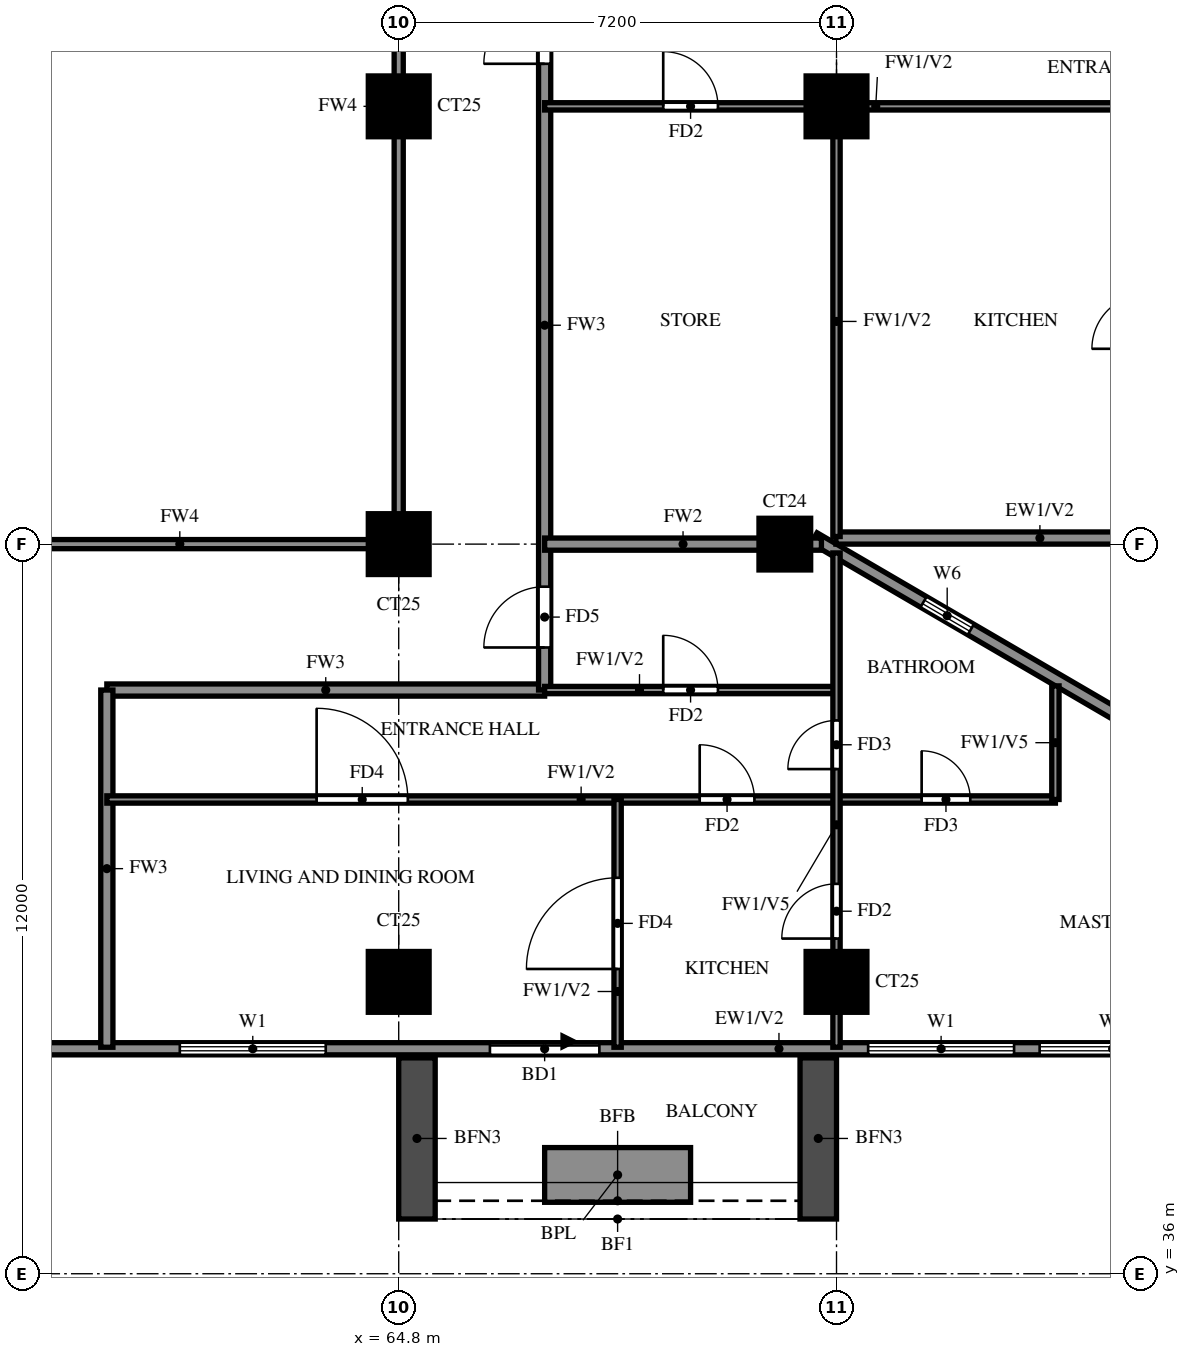
"""IFC4 building model, lengths in metres.
Left out: names, types, materials, properties, quantities, classifications, styles, units other than length and angle.
Written with IfcOpenShell. Run it as: python <this file> out.ifc"""

import sys

from ifc_helpers import new_model, si_unit, direction, frame, frame_2d, origin, origin_2d, place, context, subcontext, project, spatial, rectangle, extrude, source, transform, mapped, element, fill, save


model = new_model("IFC4")
c1 = context("Model", 3, precision=1e-05, world=origin(), true_north=direction((0.0, 1.0)))
c2 = subcontext(c1, "Body", "Model", "MODEL_VIEW")
j1 = project(units=[si_unit("LENGTHUNIT", "METRE"), si_unit("PLANEANGLEUNIT", "RADIAN")], contexts=[c1])
p1 = place(None, origin())
s1 = spatial("IfcSite", under=j1, at=p1, CompositionType="ELEMENT")
p2 = place(p1, origin())
s2 = spatial("IfcBuilding", under=s1, at=p2, CompositionType="ELEMENT")
p3 = place(p2, frame((0.0, 0.0, 160.5)))
s3 = spatial("IfcBuildingStorey", under=s2, at=p3, CompositionType="ELEMENT", Elevation=160.5)
m1 = source(origin(), c2, "Body", "SweptSolid", [
    extrude(rectangle(XDim=1.0, YDim=1.0, at=origin_2d()), origin(), (0.0, 0.0, 1.0), 3.2),
])
for number, where, z_axis, x_axis in (
    (1, (64.8, 40.8, 0.0), (0.0, 0.0, 1.0), (1.0, 0.0, 0.0)),
    (2, (72.0, 40.8, 0.0), (0.0, 0.0, 1.0), (1.0, 0.0, 0.0)),
    (3, (64.8, 48.0, 0.0), (0.0, 0.0, 1.0), (1.0, 0.0, 0.0)),
):
    element("IfcColumn", number, at=place(p3, frame(where, z_axis=z_axis, x_axis=x_axis)), inside=s3, PredefinedType="COLUMN", context=c2, shape_type="MappedRepresentation", body=[
        mapped(m1, transform((0.0, 0.0, 0.0))),
    ])
m2 = source(origin(), c2, "Body", "SweptSolid", [
    extrude(rectangle(XDim=0.85, YDim=0.85, at=origin_2d()), origin(), (0.0, 0.0, 1.0), 3.2),
])
p4 = place(p3, frame((71.15, 48.0, 0.0), z_axis=(0.0, 0.0, 1.0), x_axis=(1.0, 0.0, 0.0)))
e4 = element("IfcColumn", 4, at=p4, inside=s3, PredefinedType="COLUMN", context=c2, shape_type="MappedRepresentation", body=[
    mapped(m2, transform((0.0, 0.0, 0.0))),
])
for number, where, z_axis, x_axis in (
    (5, (64.8, 55.2, 0.0), (0.0, 0.0, 1.0), (1.0, 0.0, 0.0)),
    (6, (72.0, 55.2, 0.0), (0.0, 0.0, 1.0), (1.0, 0.0, 0.0)),
):
    element("IfcColumn", number, at=place(p3, frame(where, z_axis=z_axis, x_axis=x_axis)), inside=s3, PredefinedType="COLUMN", context=c2, shape_type="MappedRepresentation", body=[
        mapped(m1, transform((0.0, 0.0, 0.0))),
    ])
p5 = place(p3, frame((85.719, 39.881, 0.0), z_axis=(0.0, 0.0, 1.0), x_axis=(-0.86377618652, 0.503875678716, 0.0)))
e7 = element("IfcWall", 7, at=p5, inside=s3, PredefinedType="SOLIDWALL", context=c2, shape_type="SweptSolid", body=[
    extrude(rectangle(XDim=16.311, YDim=0.2, at=frame_2d((8.156, 0.0))), origin(), (0.0, 0.0, 1.0), 3.2),
])
p6 = place(p5, frame((13.326, 0.0, 1.5)))
e8 = element("IfcOpeningElement", 8, at=p6, cuts=e7, PredefinedType="OPENING", context=c2, shape_type="SweptSolid", body=[
    extrude(rectangle(XDim=0.9, YDim=0.9, at=frame_2d((0.45, 0.45))), frame((0.0, 0.11, 0.0), z_axis=(0.0, -1.0, 0.0), x_axis=(1.0, 0.0, 0.0)), (0.0, 0.0, 1.0), 0.22),
])
p7 = place(p3, frame((71.99, 48.1, 0.0), z_axis=(0.0, 0.0, 1.0), x_axis=(1.0, 0.0, 0.0)))
e9 = element("IfcWall", 9, at=p7, inside=s3, PredefinedType="SOLIDWALL", context=c2, shape_type="SweptSolid", body=[
    extrude(rectangle(XDim=6.71, YDim=0.2, at=frame_2d((3.355, 0.0))), origin(), (0.0, 0.0, 1.0), 3.2),
])
p8 = place(p3, frame((58.8, 39.7, 0.0), z_axis=(0.0, 0.0, 1.0), x_axis=(1.0, 0.0, 0.0)))
e10 = element("IfcWall", 10, at=p8, inside=s3, PredefinedType="SOLIDWALL", context=c2, shape_type="SweptSolid", body=[
    extrude(rectangle(XDim=27.23, YDim=0.2, at=frame_2d((13.615, 0.0))), origin(), (0.0, 0.0, 1.0), 3.2),
])
p9 = place(p8, frame((7.5, 0.0, 0.0)))
e11 = element("IfcOpeningElement", 11, at=p9, cuts=e10, PredefinedType="OPENING", context=c2, shape_type="SweptSolid", body=[
    extrude(rectangle(XDim=1.8, YDim=2.4, at=frame_2d((0.9, 1.2))), frame((0.0, 0.11, 0.0), z_axis=(0.0, -1.0, 0.0), x_axis=(1.0, 0.0, 0.0)), (0.0, 0.0, 1.0), 0.22),
])
p10 = place(p8, frame((2.4, 0.0, 0.6)))
e12 = element("IfcOpeningElement", 12, at=p10, cuts=e10, PredefinedType="OPENING", context=c2, shape_type="SweptSolid", body=[
    extrude(rectangle(XDim=2.4, YDim=2.4, at=frame_2d((1.2, 1.2))), frame((0.0, 0.11, 0.0), z_axis=(0.0, -1.0, 0.0), x_axis=(1.0, 0.0, 0.0)), (0.0, 0.0, 1.0), 0.22),
])
p11 = place(p8, frame((13.72, 0.0, 0.6)))
e13 = element("IfcOpeningElement", 13, at=p11, cuts=e10, PredefinedType="OPENING", context=c2, shape_type="SweptSolid", body=[
    extrude(rectangle(XDim=2.4, YDim=2.4, at=frame_2d((1.2, 1.2))), frame((0.0, 0.11, 0.0), z_axis=(0.0, -1.0, 0.0), x_axis=(1.0, 0.0, 0.0)), (0.0, 0.0, 1.0), 0.22),
])
p12 = place(p8, frame((16.541, 0.0, 0.6)))
e14 = element("IfcOpeningElement", 14, at=p12, cuts=e10, PredefinedType="OPENING", context=c2, shape_type="SweptSolid", body=[
    extrude(rectangle(XDim=2.4, YDim=2.4, at=frame_2d((1.2, 1.2))), frame((0.0, 0.11, 0.0), z_axis=(0.0, -1.0, 0.0), x_axis=(1.0, 0.0, 0.0)), (0.0, 0.0, 1.0), 0.22),
])
p13 = place(p8, frame((19.361, 0.0, 0.6)))
e15 = element("IfcOpeningElement", 15, at=p13, cuts=e10, PredefinedType="OPENING", context=c2, shape_type="SweptSolid", body=[
    extrude(rectangle(XDim=2.4, YDim=2.4, at=frame_2d((1.2, 1.2))), frame((0.0, 0.11, 0.0), z_axis=(0.0, -1.0, 0.0), x_axis=(1.0, 0.0, 0.0)), (0.0, 0.0, 1.0), 0.22),
])
p14 = place(p8, frame((22.181, 0.0, 0.6)))
e16 = element("IfcOpeningElement", 16, at=p14, cuts=e10, PredefinedType="OPENING", context=c2, shape_type="SweptSolid", body=[
    extrude(rectangle(XDim=2.4, YDim=2.4, at=frame_2d((1.2, 1.2))), frame((0.0, 0.11, 0.0), z_axis=(0.0, -1.0, 0.0), x_axis=(1.0, 0.0, 0.0)), (0.0, 0.0, 1.0), 0.22),
])
p15 = place(p8, frame((25.99, 0.0, 0.6)))
e17 = element("IfcOpeningElement", 17, at=p15, cuts=e10, PredefinedType="OPENING", context=c2, shape_type="SweptSolid", body=[
    extrude(rectangle(XDim=0.9, YDim=2.4, at=frame_2d((0.45, 1.2))), frame((0.0, 0.11, 0.0), z_axis=(0.0, -1.0, 0.0), x_axis=(1.0, 0.0, 0.0)), (0.0, 0.0, 1.0), 0.22),
])
for number, where, z_axis, x_axis in (
    (18, (65.1, 39.55, 0.0), (0.0, 0.0, 1.0), (0.0, -1.0, 0.0)),
    (19, (71.7, 39.55, 0.0), (0.0, 0.0, 1.0), (0.0, -1.0, 0.0)),
):
    element("IfcWall", number, at=place(p3, frame(where, z_axis=z_axis, x_axis=x_axis)), inside=s3, PredefinedType="SOLIDWALL", context=c2, shape_type="SweptSolid", body=[
        extrude(rectangle(XDim=2.65, YDim=0.6, at=frame_2d((1.325, 0.0))), origin(), (0.0, 0.0, 1.0), 2.85),
    ])
p16 = place(p3, frame((67.2, 37.625, 0.0), z_axis=(0.0, 0.0, 1.0), x_axis=(1.0, 0.0, 0.0)))
e20 = element("IfcWall", 20, at=p16, inside=s3, PredefinedType="SOLIDWALL", context=c2, shape_type="SweptSolid", body=[
    extrude(rectangle(XDim=2.4, YDim=0.9, at=frame_2d((1.2, 0.0))), origin(), (0.0, 0.0, 1.0), 0.9),
])
p17 = place(p3, frame((60.0, 45.6, 0.0), z_axis=(0.0, 0.0, 1.0), x_axis=(1.0, 0.0, 0.0)))
e21 = element("IfcWall", 21, at=p17, inside=s3, PredefinedType="SOLIDWALL", context=c2, shape_type="SweptSolid", body=[
    extrude(rectangle(XDim=7.2, YDim=0.2, at=frame_2d((3.6, 0.0))), origin(), (0.0, 0.0, 1.0), 3.2),
])
p18 = place(p3, frame((60.0, 39.725, 0.0), z_axis=(0.0, 0.0, 1.0), x_axis=(0.0, 1.0, 0.0)))
e22 = element("IfcWall", 22, at=p18, inside=s3, PredefinedType="SOLIDWALL", context=c2, shape_type="SweptSolid", body=[
    extrude(rectangle(XDim=5.875, YDim=0.2, at=frame_2d((2.938, 0.0))), origin(), (0.0, 0.0, 1.0), 3.2),
])
p19 = place(p3, frame((67.2, 45.6, 0.0), z_axis=(0.0, 0.0, 1.0), x_axis=(0.0, 1.0, 0.0)))
e23 = element("IfcWall", 23, at=p19, inside=s3, PredefinedType="SOLIDWALL", context=c2, shape_type="SweptSolid", body=[
    extrude(rectangle(XDim=12.0, YDim=0.2, at=frame_2d((6.0, 0.0))), origin(), (0.0, 0.0, 1.0), 3.2),
])
p20 = place(p19, frame((10.3, 0.0, 0.0)))
e24 = element("IfcOpeningElement", 24, at=p20, cuts=e23, PredefinedType="OPENING", context=c2, shape_type="SweptSolid", body=[
    extrude(rectangle(XDim=1.0, YDim=2.1, at=frame_2d((0.5, 1.05))), frame((0.0, 0.11, 0.0), z_axis=(0.0, -1.0, 0.0), x_axis=(1.0, 0.0, 0.0)), (0.0, 0.0, 1.0), 0.22),
])
p21 = place(p19, frame((0.7, 0.0, 0.0)))
e25 = element("IfcOpeningElement", 25, at=p21, cuts=e23, PredefinedType="OPENING", context=c2, shape_type="SweptSolid", body=[
    extrude(rectangle(XDim=1.0, YDim=2.1, at=frame_2d((0.5, 1.05))), frame((0.0, 0.11, 0.0), z_axis=(0.0, -1.0, 0.0), x_axis=(1.0, 0.0, 0.0)), (0.0, 0.0, 1.0), 0.22),
])
p22 = place(p3, frame((67.2, 48.0, 0.0), z_axis=(0.0, 0.0, 1.0), x_axis=(1.0, 0.0, 0.0)))
e26 = element("IfcWall", 26, at=p22, inside=s3, PredefinedType="SOLIDWALL", context=c2, shape_type="SweptSolid", body=[
    extrude(rectangle(XDim=4.552, YDim=0.2, at=frame_2d((2.276, 0.0))), origin(), (0.0, 0.0, 1.0), 3.2),
])
p23 = place(p3, frame((60.0, 43.8, 0.0), z_axis=(0.0, 0.0, 1.0), x_axis=(1.0, 0.0, 0.0)))
e27 = element("IfcWall", 27, at=p23, inside=s3, PredefinedType="PARTITIONING", context=c2, shape_type="SweptSolid", body=[
    extrude(rectangle(XDim=15.6, YDim=0.12, at=frame_2d((7.8, 0.0))), origin(), (0.0, 0.0, 1.0), 3.2),
])
p24 = place(p23, frame((9.75, 0.0, 0.0)))
e28 = element("IfcOpeningElement", 28, at=p24, cuts=e27, PredefinedType="OPENING", context=c2, shape_type="SweptSolid", body=[
    extrude(rectangle(XDim=0.9, YDim=2.1, at=frame_2d((0.45, 1.05))), frame((0.0, 0.07, 0.0), z_axis=(0.0, -1.0, 0.0), x_axis=(1.0, 0.0, 0.0)), (0.0, 0.0, 1.0), 0.14),
])
p25 = place(p23, frame((3.45, 0.0, 0.0)))
e29 = element("IfcOpeningElement", 29, at=p25, cuts=e27, PredefinedType="OPENING", context=c2, shape_type="SweptSolid", body=[
    extrude(rectangle(XDim=1.5, YDim=2.1, at=frame_2d((0.75, 1.05))), frame((0.0, 0.07, 0.0), z_axis=(0.0, -1.0, 0.0), x_axis=(1.0, 0.0, 0.0)), (0.0, 0.0, 1.0), 0.14),
])
p26 = place(p23, frame((13.4, 0.0, 0.0)))
e30 = element("IfcOpeningElement", 30, at=p26, cuts=e27, PredefinedType="OPENING", context=c2, shape_type="SweptSolid", body=[
    extrude(rectangle(XDim=0.8, YDim=2.1, at=frame_2d((0.4, 1.05))), frame((0.0, 0.07, 0.0), z_axis=(0.0, -1.0, 0.0), x_axis=(1.0, 0.0, 0.0)), (0.0, 0.0, 1.0), 0.14),
])
p27 = place(p3, frame((67.2, 45.6, 0.0), z_axis=(0.0, 0.0, 1.0), x_axis=(1.0, 0.0, 0.0)))
e31 = element("IfcWall", 31, at=p27, inside=s3, PredefinedType="PARTITIONING", context=c2, shape_type="SweptSolid", body=[
    extrude(rectangle(XDim=4.8, YDim=0.12, at=frame_2d((2.4, 0.0))), origin(), (0.0, 0.0, 1.0), 3.2),
])
p28 = place(p27, frame((1.95, 0.0, 0.0)))
e32 = element("IfcOpeningElement", 32, at=p28, cuts=e31, PredefinedType="OPENING", context=c2, shape_type="SweptSolid", body=[
    extrude(rectangle(XDim=0.9, YDim=2.1, at=frame_2d((0.45, 1.05))), frame((0.0, 0.07, 0.0), z_axis=(0.0, -1.0, 0.0), x_axis=(1.0, 0.0, 0.0)), (0.0, 0.0, 1.0), 0.14),
])
p29 = place(p3, frame((67.2, 55.2, 0.0), z_axis=(0.0, 0.0, 1.0), x_axis=(1.0, 0.0, 0.0)))
e33 = element("IfcWall", 33, at=p29, inside=s3, PredefinedType="PARTITIONING", context=c2, shape_type="SweptSolid", body=[
    extrude(rectangle(XDim=9.9, YDim=0.12, at=frame_2d((4.95, 0.0))), origin(), (0.0, 0.0, 1.0), 3.2),
])
p30 = place(p29, frame((1.95, 0.0, 0.0)))
e34 = element("IfcOpeningElement", 34, at=p30, cuts=e33, PredefinedType="OPENING", context=c2, shape_type="SweptSolid", body=[
    extrude(rectangle(XDim=0.9, YDim=2.1, at=frame_2d((0.45, 1.05))), frame((0.0, 0.07, 0.0), z_axis=(0.0, -1.0, 0.0), x_axis=(1.0, 0.0, 0.0)), (0.0, 0.0, 1.0), 0.14),
])
p31 = place(p3, frame((68.4, 39.725, 0.0), z_axis=(0.0, 0.0, 1.0), x_axis=(0.0, 1.0, 0.0)))
e35 = element("IfcWall", 35, at=p31, inside=s3, PredefinedType="PARTITIONING", context=c2, shape_type="SweptSolid", body=[
    extrude(rectangle(XDim=4.075, YDim=0.12, at=frame_2d((2.038, 0.0))), origin(), (0.0, 0.0, 1.0), 3.2),
])
p32 = place(p31, frame((1.288, 0.0, 0.0)))
e36 = element("IfcOpeningElement", 36, at=p32, cuts=e35, PredefinedType="OPENING", context=c2, shape_type="SweptSolid", body=[
    extrude(rectangle(XDim=1.5, YDim=2.1, at=frame_2d((0.75, 1.05))), frame((0.0, 0.07, 0.0), z_axis=(0.0, -1.0, 0.0), x_axis=(1.0, 0.0, 0.0)), (0.0, 0.0, 1.0), 0.14),
])
p33 = place(p3, frame((72.0, 39.725, 0.0), z_axis=(0.0, 0.0, 1.0), x_axis=(0.0, 1.0, 0.0)))
e37 = element("IfcWall", 37, at=p33, inside=s3, PredefinedType="PARTITIONING", context=c2, shape_type="SweptSolid", body=[
    extrude(rectangle(XDim=8.13, YDim=0.12, at=frame_2d((4.065, 0.0))), origin(), (0.0, 0.0, 1.0), 2.3),
])
p34 = place(p33, frame((1.788, 0.0, 0.0)))
e38 = element("IfcOpeningElement", 38, at=p34, cuts=e37, PredefinedType="OPENING", context=c2, shape_type="SweptSolid", body=[
    extrude(rectangle(XDim=0.9, YDim=2.1, at=frame_2d((0.45, 1.05))), frame((0.0, 0.07, 0.0), z_axis=(0.0, -1.0, 0.0), x_axis=(1.0, 0.0, 0.0)), (0.0, 0.0, 1.0), 0.14),
])
p35 = place(p33, frame((4.575, 0.0, 0.0)))
e39 = element("IfcOpeningElement", 39, at=p35, cuts=e37, PredefinedType="OPENING", context=c2, shape_type="SweptSolid", body=[
    extrude(rectangle(XDim=0.8, YDim=2.1, at=frame_2d((0.4, 1.05))), frame((0.0, 0.07, 0.0), z_axis=(0.0, -1.0, 0.0), x_axis=(1.0, 0.0, 0.0)), (0.0, 0.0, 1.0), 0.14),
])
p36 = place(p3, frame((72.0, 48.125, 0.0), z_axis=(0.0, 0.0, 1.0), x_axis=(0.0, 1.0, 0.0)))
e40 = element("IfcWall", 40, at=p36, inside=s3, PredefinedType="PARTITIONING", context=c2, shape_type="SweptSolid", body=[
    extrude(rectangle(XDim=7.075, YDim=0.12, at=frame_2d((3.538, 0.0))), origin(), (0.0, 0.0, 1.0), 3.2),
])
p37 = place(p3, frame((75.6, 43.8, 0.0), z_axis=(0.0, 0.0, 1.0), x_axis=(0.0, 1.0, 0.0)))
e41 = element("IfcWall", 41, at=p37, inside=s3, PredefinedType="PARTITIONING", context=c2, shape_type="SweptSolid", body=[
    extrude(rectangle(XDim=1.868, YDim=0.12, at=frame_2d((0.934, 0.0))), origin(), (0.0, 0.0, 1.0), 2.3),
])
p38 = place(p3, frame((57.6, 48.0, 0.0), z_axis=(0.0, 0.0, 1.0), x_axis=(1.0, 0.0, 0.0)))
e42 = element("IfcWall", 42, at=p38, inside=s3, PredefinedType="SOLIDWALL", context=c2, shape_type="SweptSolid", body=[
    extrude(rectangle(XDim=7.2, YDim=0.15, at=frame_2d((3.6, 0.0))), origin(), (0.0, 0.0, 1.0), 2.3),
])
p39 = place(p3, frame((64.8, 48.0, 0.0), z_axis=(0.0, 0.0, 1.0), x_axis=(0.0, 1.0, 0.0)))
e43 = element("IfcWall", 43, at=p39, inside=s3, PredefinedType="SOLIDWALL", context=c2, shape_type="SweptSolid", body=[
    extrude(rectangle(XDim=14.4, YDim=0.15, at=frame_2d((7.2, 0.0))), origin(), (0.0, 0.0, 1.0), 2.3),
])
p40 = place(p6, origin())
e44 = element("IfcWindow", 44, at=p40, inside=s3, PartitioningType="SINGLE_PANEL", PredefinedType="WINDOW", context=c2, shape_type="SweptSolid", body=[
    extrude(rectangle(XDim=0.9, YDim=0.9, at=frame_2d((0.45, 0.45))), frame((0.0, 0.03, 0.0), z_axis=(0.0, -1.0, 0.0), x_axis=(1.0, 0.0, 0.0)), (0.0, 0.0, 1.0), 0.06),
])
fill(e8, e44)
p41 = place(p9, origin())
e45 = element("IfcDoor", 45, at=p41, inside=s3, OperationType="DOUBLE_DOOR_SLIDING", PredefinedType="DOOR", context=c2, shape_type="SweptSolid", body=[
    extrude(rectangle(XDim=1.8, YDim=2.4, at=frame_2d((0.9, 1.2))), frame((0.0, 0.025, 0.0), z_axis=(0.0, -1.0, 0.0), x_axis=(1.0, 0.0, 0.0)), (0.0, 0.0, 1.0), 0.05),
])
fill(e11, e45)
p42 = place(p10, origin())
e46 = element("IfcWindow", 46, at=p42, inside=s3, PartitioningType="DOUBLE_PANEL_VERTICAL", PredefinedType="WINDOW", context=c2, shape_type="SweptSolid", body=[
    extrude(rectangle(XDim=2.4, YDim=2.4, at=frame_2d((1.2, 1.2))), frame((0.0, 0.03, 0.0), z_axis=(0.0, -1.0, 0.0), x_axis=(1.0, 0.0, 0.0)), (0.0, 0.0, 1.0), 0.06),
])
fill(e12, e46)
p43 = place(p11, origin())
e47 = element("IfcWindow", 47, at=p43, inside=s3, PartitioningType="DOUBLE_PANEL_VERTICAL", PredefinedType="WINDOW", context=c2, shape_type="SweptSolid", body=[
    extrude(rectangle(XDim=2.4, YDim=2.4, at=frame_2d((1.2, 1.2))), frame((0.0, 0.03, 0.0), z_axis=(0.0, -1.0, 0.0), x_axis=(1.0, 0.0, 0.0)), (0.0, 0.0, 1.0), 0.06),
])
fill(e13, e47)
p44 = place(p12, origin())
e48 = element("IfcWindow", 48, at=p44, inside=s3, PartitioningType="DOUBLE_PANEL_VERTICAL", PredefinedType="WINDOW", context=c2, shape_type="SweptSolid", body=[
    extrude(rectangle(XDim=2.4, YDim=2.4, at=frame_2d((1.2, 1.2))), frame((0.0, 0.03, 0.0), z_axis=(0.0, -1.0, 0.0), x_axis=(1.0, 0.0, 0.0)), (0.0, 0.0, 1.0), 0.06),
])
fill(e14, e48)
p45 = place(p20, origin())
e49 = element("IfcDoor", 49, at=p45, inside=s3, OperationType="SINGLE_SWING_LEFT", PredefinedType="DOOR", context=c2, shape_type="SweptSolid", body=[
    extrude(rectangle(XDim=1.0, YDim=2.1, at=frame_2d((0.5, 1.05))), frame((0.0, 0.025, 0.0), z_axis=(0.0, -1.0, 0.0), x_axis=(1.0, 0.0, 0.0)), (0.0, 0.0, 1.0), 0.05),
])
fill(e24, e49)
p46 = place(p30, origin())
e50 = element("IfcDoor", 50, at=p46, inside=s3, OperationType="SINGLE_SWING_LEFT", PredefinedType="DOOR", context=c2, shape_type="SweptSolid", body=[
    extrude(rectangle(XDim=0.9, YDim=2.1, at=frame_2d((0.45, 1.05))), frame((0.0, 0.025, 0.0), z_axis=(0.0, -1.0, 0.0), x_axis=(1.0, 0.0, 0.0)), (0.0, 0.0, 1.0), 0.05),
])
fill(e34, e50)
p47 = place(p32, origin())
e51 = element("IfcDoor", 51, at=p47, inside=s3, OperationType="SINGLE_SWING_LEFT", PredefinedType="DOOR", context=c2, shape_type="SweptSolid", body=[
    extrude(rectangle(XDim=1.5, YDim=2.1, at=frame_2d((0.75, 1.05))), frame((0.0, 0.025, 0.0), z_axis=(0.0, -1.0, 0.0), x_axis=(1.0, 0.0, 0.0)), (0.0, 0.0, 1.0), 0.05),
])
fill(e36, e51)
p48 = place(p28, origin())
e52 = element("IfcDoor", 52, at=p48, inside=s3, OperationType="SINGLE_SWING_RIGHT", PredefinedType="DOOR", context=c2, shape_type="SweptSolid", body=[
    extrude(rectangle(XDim=0.9, YDim=2.1, at=frame_2d((0.45, 1.05))), frame((0.0, 0.025, 0.0), z_axis=(0.0, -1.0, 0.0), x_axis=(1.0, 0.0, 0.0)), (0.0, 0.0, 1.0), 0.05),
])
fill(e32, e52)
p49 = place(p21, origin())
e53 = element("IfcDoor", 53, at=p49, inside=s3, OperationType="SINGLE_SWING_LEFT", PredefinedType="DOOR", context=c2, shape_type="SweptSolid", body=[
    extrude(rectangle(XDim=1.0, YDim=2.1, at=frame_2d((0.5, 1.05))), frame((0.0, 0.025, 0.0), z_axis=(0.0, -1.0, 0.0), x_axis=(1.0, 0.0, 0.0)), (0.0, 0.0, 1.0), 0.05),
])
fill(e25, e53)
p50 = place(p24, origin())
e54 = element("IfcDoor", 54, at=p50, inside=s3, OperationType="SINGLE_SWING_LEFT", PredefinedType="DOOR", context=c2, shape_type="SweptSolid", body=[
    extrude(rectangle(XDim=0.9, YDim=2.1, at=frame_2d((0.45, 1.05))), frame((0.0, 0.025, 0.0), z_axis=(0.0, -1.0, 0.0), x_axis=(1.0, 0.0, 0.0)), (0.0, 0.0, 1.0), 0.05),
])
fill(e28, e54)
p51 = place(p25, origin())
e55 = element("IfcDoor", 55, at=p51, inside=s3, OperationType="SINGLE_SWING_RIGHT", PredefinedType="DOOR", context=c2, shape_type="SweptSolid", body=[
    extrude(rectangle(XDim=1.5, YDim=2.1, at=frame_2d((0.75, 1.05))), frame((0.0, 0.025, 0.0), z_axis=(0.0, -1.0, 0.0), x_axis=(1.0, 0.0, 0.0)), (0.0, 0.0, 1.0), 0.05),
])
fill(e29, e55)
p52 = place(p34, origin())
e56 = element("IfcDoor", 56, at=p52, inside=s3, OperationType="SINGLE_SWING_RIGHT", PredefinedType="DOOR", context=c2, shape_type="SweptSolid", body=[
    extrude(rectangle(XDim=0.9, YDim=2.1, at=frame_2d((0.45, 1.05))), frame((0.0, 0.025, 0.0), z_axis=(0.0, -1.0, 0.0), x_axis=(1.0, 0.0, 0.0)), (0.0, 0.0, 1.0), 0.05),
])
fill(e38, e56)
p53 = place(p35, origin())
e57 = element("IfcDoor", 57, at=p53, inside=s3, OperationType="SINGLE_SWING_LEFT", PredefinedType="DOOR", context=c2, shape_type="SweptSolid", body=[
    extrude(rectangle(XDim=0.8, YDim=2.1, at=frame_2d((0.4, 1.05))), frame((0.0, 0.025, 0.0), z_axis=(0.0, -1.0, 0.0), x_axis=(1.0, 0.0, 0.0)), (0.0, 0.0, 1.0), 0.05),
])
fill(e39, e57)
p54 = place(p26, origin())
e58 = element("IfcDoor", 58, at=p54, inside=s3, OperationType="SINGLE_SWING_RIGHT", PredefinedType="DOOR", context=c2, shape_type="SweptSolid", body=[
    extrude(rectangle(XDim=0.8, YDim=2.1, at=frame_2d((0.4, 1.05))), frame((0.0, 0.025, 0.0), z_axis=(0.0, -1.0, 0.0), x_axis=(1.0, 0.0, 0.0)), (0.0, 0.0, 1.0), 0.05),
])
fill(e30, e58)
save(model, sys.argv[1])
